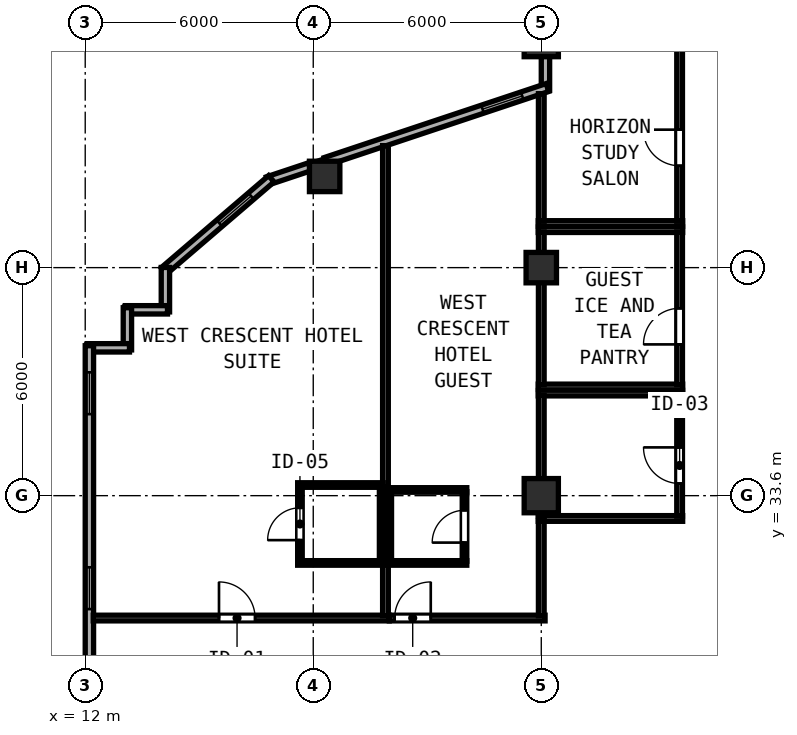
"""IFC4 building model, lengths in metres.
Left out: names, types, materials, properties, quantities, classifications, styles, units other than length and angle.
Written with IfcOpenShell. Run it as: python <this file> out.ifc"""

import sys

from ifc_helpers import new_model, si_unit, direction, frame, frame_2d, origin, origin_2d, place, context, subcontext, project, spatial, rectangle, hollow_rectangle, extrude, element, fill, save


model = new_model("IFC4")
c1 = context("Model", 3, precision=1e-05, world=origin(), true_north=direction((0.0, 1.0)))
c2 = subcontext(c1, "Body", "Model", "MODEL_VIEW")
j1 = project(units=[si_unit("LENGTHUNIT", "METRE"), si_unit("PLANEANGLEUNIT", "RADIAN")], contexts=[c1])
p1 = place(None, origin())
s1 = spatial("IfcSite", under=j1, at=p1, CompositionType="ELEMENT")
p2 = place(p1, origin())
s2 = spatial("IfcBuilding", under=s1, at=p2, CompositionType="ELEMENT")
p3 = place(p2, frame((0.0, 0.0, 176.6)))
s3 = spatial("IfcBuildingStorey", under=s2, at=p3, CompositionType="ELEMENT", Elevation=176.6)
for number, where, z_axis, x_axis in (
    (1, (24.0, 33.6, 0.0), (0.0, 0.0, 1.0), (1.0, 0.0, 0.0)),
    (2, (24.0, 45.6, 0.0), (0.0, 0.0, 1.0), (1.0, 0.0, 0.0)),
):
    element("IfcColumn", number, at=place(p3, frame(where, z_axis=z_axis, x_axis=x_axis)), inside=s3, PredefinedType="COLUMN", context=c2, shape_type="SweptSolid", body=[
        extrude(hollow_rectangle(XDim=0.9, YDim=0.9, WallThickness=0.034, at=origin_2d()), origin(), (0.0, 0.0, 1.0), 3.8),
    ])
for number, where, z_axis, x_axis in (
    (3, (24.0, 39.6, 0.0), (0.0, 0.0, 1.0), (1.0, 0.0, 0.0)),
    (4, (18.3, 42.0, 0.0), (0.0, 0.0, 1.0), (1.0, 0.0, 0.0)),
):
    element("IfcColumn", number, at=place(p3, frame(where, z_axis=z_axis, x_axis=x_axis)), inside=s3, PredefinedType="COLUMN", context=c2, shape_type="SweptSolid", body=[
        extrude(hollow_rectangle(XDim=0.8, YDim=0.8, WallThickness=0.03, at=origin_2d()), origin(), (0.0, 0.0, 1.0), 3.8),
    ])
p4 = place(p3, frame((24.11, 45.158, 0.0), z_axis=(0.0, 0.0, 1.0), x_axis=(0.0, -1.0, 0.0)))
e5 = element("IfcWall", 5, at=p4, inside=s3, PredefinedType="SOLIDWALL", context=c2, shape_type="SweptSolid", body=[
    extrude(rectangle(XDim=0.892, YDim=0.22, at=frame_2d((0.446, 0.0))), origin(), (0.0, 0.0, 1.0), 3.215),
])
p5 = place(p3, frame((24.162, 44.338, 0.0), z_axis=(0.0, 0.0, 1.0), x_axis=(-0.948687265055, -0.316215864755, 0.0)))
e6 = element("IfcWall", 6, at=p5, inside=s3, PredefinedType="SOLIDWALL", context=c2, shape_type="SweptSolid", body=[
    extrude(rectangle(XDim=6.154, YDim=0.22, at=frame_2d((3.077, 0.0))), origin(), (0.0, 0.0, 1.0), 3.215),
])
p6 = place(p5, frame((0.7, 0.0, 0.85)))
e7 = element("IfcOpeningElement", 7, at=p6, cuts=e6, PredefinedType="OPENING", context=c2, shape_type="SweptSolid", body=[
    extrude(rectangle(XDim=1.1, YDim=1.75, at=frame_2d((0.55, 0.875))), frame((0.0, 0.12, 0.0), z_axis=(0.0, -1.0, 0.0), x_axis=(1.0, 0.0, 0.0)), (0.0, 0.0, 1.0), 0.24),
])
p7 = place(p3, frame((17.908, 42.253, 0.0), z_axis=(0.0, 0.0, 1.0), x_axis=(-0.948662335685, -0.316290646166, 0.0)))
e8 = element("IfcWall", 8, at=p7, inside=s3, PredefinedType="SOLIDWALL", context=c2, shape_type="SweptSolid", body=[
    extrude(rectangle(XDim=1.165, YDim=0.22, at=frame_2d((0.583, 0.0))), origin(), (0.0, 0.0, 1.0), 3.62),
])
p8 = place(p3, frame((16.897, 41.938, 0.0), z_axis=(0.0, 0.0, 1.0), x_axis=(-0.759279729622, -0.650764390686, 0.0)))
e9 = element("IfcWall", 9, at=p8, inside=s3, PredefinedType="SOLIDWALL", context=c2, shape_type="SweptSolid", body=[
    extrude(rectangle(XDim=3.726, YDim=0.22, at=frame_2d((1.863, 0.0))), origin(), (0.0, 0.0, 1.0), 3.62),
])
p9 = place(p8, frame((0.7, 0.0, 0.85)))
e10 = element("IfcOpeningElement", 10, at=p9, cuts=e9, PredefinedType="OPENING", context=c2, shape_type="SweptSolid", body=[
    extrude(rectangle(XDim=1.1, YDim=1.75, at=frame_2d((0.55, 0.875))), frame((0.0, 0.12, 0.0), z_axis=(0.0, -1.0, 0.0), x_axis=(1.0, 0.0, 0.0)), (0.0, 0.0, 1.0), 0.24),
])
p10 = place(p3, frame((14.11, 39.604, 0.0), z_axis=(0.0, 0.0, 1.0), x_axis=(0.0, -1.0, 0.0)))
e11 = element("IfcWall", 11, at=p10, inside=s3, PredefinedType="SOLIDWALL", context=c2, shape_type="SweptSolid", body=[
    extrude(rectangle(XDim=1.169, YDim=0.22, at=frame_2d((0.585, 0.0))), origin(), (0.0, 0.0, 1.0), 3.62),
])
p11 = place(p3, frame((14.165, 38.49, 0.0), z_axis=(0.0, 0.0, 1.0), x_axis=(-1.0, 0.0, 0.0)))
e12 = element("IfcWall", 12, at=p11, inside=s3, PredefinedType="SOLIDWALL", context=c2, shape_type="SweptSolid", body=[
    extrude(rectangle(XDim=1.11, YDim=0.22, at=frame_2d((0.555, 0.0))), origin(), (0.0, 0.0, 1.0), 3.62),
])
p12 = place(p3, frame((13.11, 38.545, 0.0), z_axis=(0.0, 0.0, 1.0), x_axis=(0.0, -1.0, 0.0)))
e13 = element("IfcWall", 13, at=p12, inside=s3, PredefinedType="SOLIDWALL", context=c2, shape_type="SweptSolid", body=[
    extrude(rectangle(XDim=1.11, YDim=0.22, at=frame_2d((0.555, 0.0))), origin(), (0.0, 0.0, 1.0), 3.62),
])
p13 = place(p3, frame((13.165, 37.49, 0.0), z_axis=(0.0, 0.0, 1.0), x_axis=(-1.0, 0.0, 0.0)))
e14 = element("IfcWall", 14, at=p13, inside=s3, PredefinedType="SOLIDWALL", context=c2, shape_type="SweptSolid", body=[
    extrude(rectangle(XDim=1.11, YDim=0.22, at=frame_2d((0.555, 0.0))), origin(), (0.0, 0.0, 1.0), 3.62),
])
p14 = place(p3, frame((12.11, 37.545, 0.0), z_axis=(0.0, 0.0, 1.0), x_axis=(0.0, -1.0, 0.0)))
e15 = element("IfcWall", 15, at=p14, inside=s3, PredefinedType="SOLIDWALL", context=c2, shape_type="SweptSolid", body=[
    extrude(rectangle(XDim=21.145, YDim=0.22, at=frame_2d((10.573, 0.0))), origin(), (0.0, 0.0, 1.0), 3.62),
])
p15 = place(p14, frame((0.7, 0.0, 0.85)))
e16 = element("IfcOpeningElement", 16, at=p15, cuts=e15, PredefinedType="OPENING", context=c2, shape_type="SweptSolid", body=[
    extrude(rectangle(XDim=1.1, YDim=1.75, at=frame_2d((0.55, 0.875))), frame((0.0, 0.12, 0.0), z_axis=(0.0, -1.0, 0.0), x_axis=(1.0, 0.0, 0.0)), (0.0, 0.0, 1.0), 0.24),
])
p16 = place(p14, frame((5.83, 0.0, 0.85)))
e17 = element("IfcOpeningElement", 17, at=p16, cuts=e15, PredefinedType="OPENING", context=c2, shape_type="SweptSolid", body=[
    extrude(rectangle(XDim=1.1, YDim=1.75, at=frame_2d((0.55, 0.875))), frame((0.0, 0.12, 0.0), z_axis=(0.0, -1.0, 0.0), x_axis=(1.0, 0.0, 0.0)), (0.0, 0.0, 1.0), 0.24),
])
p17 = place(p14, frame((11.5, 0.0, 0.85)))
e18 = element("IfcOpeningElement", 18, at=p17, cuts=e15, PredefinedType="OPENING", context=c2, shape_type="SweptSolid", body=[
    extrude(rectangle(XDim=1.1, YDim=1.75, at=frame_2d((0.55, 0.875))), frame((0.0, 0.12, 0.0), z_axis=(0.0, -1.0, 0.0), x_axis=(1.0, 0.0, 0.0)), (0.0, 0.0, 1.0), 0.24),
])
p18 = place(p14, frame((16.9, 0.0, 0.85)))
e19 = element("IfcOpeningElement", 19, at=p18, cuts=e15, PredefinedType="OPENING", context=c2, shape_type="SweptSolid", body=[
    extrude(rectangle(XDim=1.1, YDim=1.75, at=frame_2d((0.55, 0.875))), frame((0.0, 0.12, 0.0), z_axis=(0.0, -1.0, 0.0), x_axis=(1.0, 0.0, 0.0)), (0.0, 0.0, 1.0), 0.24),
])
for number, where, z_axis, x_axis in (
    (20, (23.92, 36.3, 0.0), (0.0, 0.0, 1.0), (1.0, 0.0, 0.0)),
    (21, (23.92, 33.0, 0.0), (0.0, 0.0, 1.0), (1.0, 0.0, 0.0)),
):
    element("IfcWall", number, at=place(p3, frame(where, z_axis=z_axis, x_axis=x_axis)), inside=s3, PredefinedType="PARTITIONING", context=c2, shape_type="SweptSolid", body=[
        extrude(rectangle(XDim=3.8, YDim=0.15, at=frame_2d((1.9, 0.0))), origin(), (0.0, 0.0, 1.0), 3.62),
    ])
p19 = place(p3, frame((24.0, 33.06, 0.0), z_axis=(0.0, 0.0, 1.0), x_axis=(0.0, 1.0, 0.0)))
e22 = element("IfcWall", 22, at=p19, inside=s3, PredefinedType="PARTITIONING", context=c2, shape_type="SweptSolid", body=[
    extrude(rectangle(XDim=3.18, YDim=0.15, at=frame_2d((1.59, 0.0))), origin(), (0.0, 0.0, 1.0), 3.215),
])
p20 = place(p3, frame((27.64, 33.06, 0.0), z_axis=(0.0, 0.0, 1.0), x_axis=(0.0, 1.0, 0.0)))
e23 = element("IfcWall", 23, at=p20, inside=s3, PredefinedType="PARTITIONING", context=c2, shape_type="SweptSolid", body=[
    extrude(rectangle(XDim=3.18, YDim=0.15, at=frame_2d((1.59, 0.0))), origin(), (0.0, 0.0, 1.0), 3.62),
])
p21 = place(p20, frame((1.81, 0.0, 0.0), z_axis=(0.0, 0.0, 1.0), x_axis=(-1.0, 0.0, 0.0)))
e24 = element("IfcOpeningElement", 24, at=p21, cuts=e23, PredefinedType="OPENING", context=c2, shape_type="SweptSolid", body=[
    extrude(rectangle(XDim=0.95, YDim=2.12, at=frame_2d((0.475, 1.06))), frame((0.0, 0.085, 0.0), z_axis=(0.0, -1.0, 0.0), x_axis=(1.0, 0.0, 0.0)), (0.0, 0.0, 1.0), 0.17),
])
for number, where, z_axis, x_axis in (
    (25, (23.92, 40.6, 0.0), (0.0, 0.0, 1.0), (1.0, 0.0, 0.0)),
    (26, (23.92, 36.46, 0.0), (0.0, 0.0, 1.0), (1.0, 0.0, 0.0)),
):
    element("IfcWall", number, at=place(p3, frame(where, z_axis=z_axis, x_axis=x_axis)), inside=s3, PredefinedType="PARTITIONING", context=c2, shape_type="SweptSolid", body=[
        extrude(rectangle(XDim=3.8, YDim=0.15, at=frame_2d((1.9, 0.0))), origin(), (0.0, 0.0, 1.0), 3.62),
    ])
p22 = place(p3, frame((24.0, 36.52, 0.0), z_axis=(0.0, 0.0, 1.0), x_axis=(0.0, 1.0, 0.0)))
e27 = element("IfcWall", 27, at=p22, inside=s3, PredefinedType="PARTITIONING", context=c2, shape_type="SweptSolid", body=[
    extrude(rectangle(XDim=4.02, YDim=0.15, at=frame_2d((2.01, 0.0))), origin(), (0.0, 0.0, 1.0), 3.215),
])
p23 = place(p3, frame((27.64, 36.52, 0.0), z_axis=(0.0, 0.0, 1.0), x_axis=(0.0, 1.0, 0.0)))
e28 = element("IfcWall", 28, at=p23, inside=s3, PredefinedType="PARTITIONING", context=c2, shape_type="SweptSolid", body=[
    extrude(rectangle(XDim=4.02, YDim=0.15, at=frame_2d((2.01, 0.0))), origin(), (0.0, 0.0, 1.0), 3.62),
])
p24 = place(p23, frame((2.01, 0.0, 0.0), z_axis=(0.0, 0.0, 1.0), x_axis=(-1.0, 0.0, 0.0)))
e29 = element("IfcOpeningElement", 29, at=p24, cuts=e28, PredefinedType="OPENING", context=c2, shape_type="SweptSolid", body=[
    extrude(rectangle(XDim=0.95, YDim=2.12, at=frame_2d((0.475, 1.06))), frame((0.0, 0.085, 0.0), z_axis=(0.0, -1.0, 0.0), x_axis=(1.0, 0.0, 0.0)), (0.0, 0.0, 1.0), 0.17),
])
p25 = place(p3, frame((23.92, 40.76, 0.0), z_axis=(0.0, 0.0, 1.0), x_axis=(1.0, 0.0, 0.0)))
e30 = element("IfcWall", 30, at=p25, inside=s3, PredefinedType="PARTITIONING", context=c2, shape_type="SweptSolid", body=[
    extrude(rectangle(XDim=3.8, YDim=0.15, at=frame_2d((1.9, 0.0))), origin(), (0.0, 0.0, 1.0), 3.62),
])
p26 = place(p3, frame((24.0, 40.82, 0.0), z_axis=(0.0, 0.0, 1.0), x_axis=(0.0, 1.0, 0.0)))
e31 = element("IfcWall", 31, at=p26, inside=s3, PredefinedType="PARTITIONING", context=c2, shape_type="SweptSolid", body=[
    extrude(rectangle(XDim=3.356, YDim=0.15, at=frame_2d((1.678, 0.0))), origin(), (0.0, 0.0, 1.0), 3.215),
])
p27 = place(p3, frame((27.64, 40.82, 0.0), z_axis=(0.0, 0.0, 1.0), x_axis=(0.0, 1.0, 0.0)))
e32 = element("IfcWall", 32, at=p27, inside=s3, PredefinedType="PARTITIONING", context=c2, shape_type="SweptSolid", body=[
    extrude(rectangle(XDim=5.14, YDim=0.15, at=frame_2d((2.57, 0.0))), origin(), (0.0, 0.0, 1.0), 3.62),
])
p28 = place(p27, frame((2.41, 0.0, 0.0), z_axis=(0.0, 0.0, 1.0), x_axis=(-1.0, 0.0, 0.0)))
e33 = element("IfcOpeningElement", 33, at=p28, cuts=e32, PredefinedType="OPENING", context=c2, shape_type="SweptSolid", body=[
    extrude(rectangle(XDim=0.95, YDim=2.12, at=frame_2d((0.475, 1.06))), frame((0.0, 0.085, 0.0), z_axis=(0.0, -1.0, 0.0), x_axis=(1.0, 0.0, 0.0)), (0.0, 0.0, 1.0), 0.17),
])
p29 = place(p3, frame((12.212, 30.38, 0.0), z_axis=(0.0, 0.0, 1.0), x_axis=(1.0, 0.0, 0.0)))
e34 = element("IfcWall", 34, at=p29, inside=s3, PredefinedType="PARTITIONING", context=c2, shape_type="SweptSolid", body=[
    extrude(rectangle(XDim=7.788, YDim=0.15, at=frame_2d((3.894, 0.0))), origin(), (0.0, 0.0, 1.0), 3.62),
])
p30 = place(p29, frame((3.308, 0.0, 0.0)))
e35 = element("IfcOpeningElement", 35, at=p30, cuts=e34, PredefinedType="OPENING", context=c2, shape_type="SweptSolid", body=[
    extrude(rectangle(XDim=0.95, YDim=2.18, at=frame_2d((0.475, 1.09))), frame((0.0, 0.085, 0.0), z_axis=(0.0, -1.0, 0.0), x_axis=(1.0, 0.0, 0.0)), (0.0, 0.0, 1.0), 0.17),
])
p31 = place(p3, frame((19.9, 30.44, 0.0), z_axis=(0.0, 0.0, 1.0), x_axis=(0.0, 1.0, 0.0)))
e36 = element("IfcWall", 36, at=p31, inside=s3, PredefinedType="PARTITIONING", context=c2, shape_type="SweptSolid", body=[
    extrude(rectangle(XDim=12.37, YDim=0.15, at=frame_2d((6.185, 0.0))), origin(), (0.0, 0.0, 1.0), 3.62),
])
for number, where, z_axis, x_axis in (
    (37, (17.59, 33.88, 0.0), (0.0, 0.0, 1.0), (1.0, 0.0, 0.0)),
    (38, (17.59, 31.83, 0.0), (0.0, 0.0, 1.0), (1.0, 0.0, 0.0)),
):
    element("IfcWall", number, at=place(p3, frame(where, z_axis=z_axis, x_axis=x_axis)), inside=s3, PredefinedType="PARTITIONING", context=c2, shape_type="SweptSolid", body=[
        extrude(rectangle(XDim=2.25, YDim=0.12, at=frame_2d((1.125, 0.0))), origin(), (0.0, 0.0, 1.0), 3.62),
    ])
p32 = place(p3, frame((17.65, 31.875, 0.0), z_axis=(0.0, 0.0, 1.0), x_axis=(0.0, 1.0, 0.0)))
e39 = element("IfcWall", 39, at=p32, inside=s3, PredefinedType="PARTITIONING", context=c2, shape_type="SweptSolid", body=[
    extrude(rectangle(XDim=1.96, YDim=0.12, at=frame_2d((0.98, 0.0))), origin(), (0.0, 0.0, 1.0), 3.62),
])
p33 = place(p32, frame((1.405, 0.0, 0.0), z_axis=(0.0, 0.0, 1.0), x_axis=(-1.0, 0.0, 0.0)))
e40 = element("IfcOpeningElement", 40, at=p33, cuts=e39, PredefinedType="OPENING", context=c2, shape_type="SweptSolid", body=[
    extrude(rectangle(XDim=0.85, YDim=2.1, at=frame_2d((0.425, 1.05))), frame((0.0, 0.07, 0.0), z_axis=(0.0, -1.0, 0.0), x_axis=(1.0, 0.0, 0.0)), (0.0, 0.0, 1.0), 0.14),
])
p34 = place(p3, frame((19.8, 31.875, 0.0), z_axis=(0.0, 0.0, 1.0), x_axis=(0.0, 1.0, 0.0)))
e41 = element("IfcWall", 41, at=p34, inside=s3, PredefinedType="PARTITIONING", context=c2, shape_type="SweptSolid", body=[
    extrude(rectangle(XDim=1.96, YDim=0.12, at=frame_2d((0.98, 0.0))), origin(), (0.0, 0.0, 1.0), 3.62),
])
p35 = place(p3, frame((20.002, 30.38, 0.0), z_axis=(0.0, 0.0, 1.0), x_axis=(1.0, 0.0, 0.0)))
e42 = element("IfcWall", 42, at=p35, inside=s3, PredefinedType="PARTITIONING", context=c2, shape_type="SweptSolid", body=[
    extrude(rectangle(XDim=4.098, YDim=0.15, at=frame_2d((2.049, 0.0))), origin(), (0.0, 0.0, 1.0), 3.62),
])
p36 = place(p35, frame((0.14, 0.0, 0.0)))
e43 = element("IfcOpeningElement", 43, at=p36, cuts=e42, PredefinedType="OPENING", context=c2, shape_type="SweptSolid", body=[
    extrude(rectangle(XDim=0.95, YDim=2.15, at=frame_2d((0.475, 1.075))), frame((0.0, 0.085, 0.0), z_axis=(0.0, -1.0, 0.0), x_axis=(1.0, 0.0, 0.0)), (0.0, 0.0, 1.0), 0.17),
])
p37 = place(p3, frame((24.0, 30.44, 0.0), z_axis=(0.0, 0.0, 1.0), x_axis=(0.0, 1.0, 0.0)))
e44 = element("IfcWall", 44, at=p37, inside=s3, PredefinedType="PARTITIONING", context=c2, shape_type="SweptSolid", body=[
    extrude(rectangle(XDim=2.5, YDim=0.15, at=frame_2d((1.25, 0.0))), origin(), (0.0, 0.0, 1.0), 3.215),
])
for number, where, z_axis, x_axis in (
    (45, (19.96, 33.75, 0.0), (0.0, 0.0, 1.0), (1.0, 0.0, 0.0)),
    (46, (19.96, 31.83, 0.0), (0.0, 0.0, 1.0), (1.0, 0.0, 0.0)),
):
    element("IfcWall", number, at=place(p3, frame(where, z_axis=z_axis, x_axis=x_axis)), inside=s3, PredefinedType="PARTITIONING", context=c2, shape_type="SweptSolid", body=[
        extrude(rectangle(XDim=2.08, YDim=0.12, at=frame_2d((1.04, 0.0))), origin(), (0.0, 0.0, 1.0), 3.62),
    ])
p38 = place(p3, frame((20.0, 31.875, 0.0), z_axis=(0.0, 0.0, 1.0), x_axis=(0.0, 1.0, 0.0)))
e47 = element("IfcWall", 47, at=p38, inside=s3, PredefinedType="PARTITIONING", context=c2, shape_type="SweptSolid", body=[
    extrude(rectangle(XDim=1.83, YDim=0.12, at=frame_2d((0.915, 0.0))), origin(), (0.0, 0.0, 1.0), 3.62),
])
p39 = place(p3, frame((21.98, 31.875, 0.0), z_axis=(0.0, 0.0, 1.0), x_axis=(0.0, 1.0, 0.0)))
e48 = element("IfcWall", 48, at=p39, inside=s3, PredefinedType="PARTITIONING", context=c2, shape_type="SweptSolid", body=[
    extrude(rectangle(XDim=1.83, YDim=0.12, at=frame_2d((0.915, 0.0))), origin(), (0.0, 0.0, 1.0), 3.62),
])
p40 = place(p39, frame((0.49, 0.0, 0.0)))
e49 = element("IfcOpeningElement", 49, at=p40, cuts=e48, PredefinedType="OPENING", context=c2, shape_type="SweptSolid", body=[
    extrude(rectangle(XDim=0.85, YDim=2.1, at=frame_2d((0.425, 1.05))), frame((0.0, 0.07, 0.0), z_axis=(0.0, -1.0, 0.0), x_axis=(1.0, 0.0, 0.0)), (0.0, 0.0, 1.0), 0.14),
])
p41 = place(p6, origin())
e50 = element("IfcWindow", 50, at=p41, inside=s3, PartitioningType="SINGLE_PANEL", PredefinedType="WINDOW", context=c2, shape_type="SweptSolid", body=[
    extrude(rectangle(XDim=1.1, YDim=1.75, at=frame_2d((0.55, 0.875))), frame((0.0, 0.03, 0.0), z_axis=(0.0, -1.0, 0.0), x_axis=(1.0, 0.0, 0.0)), (0.0, 0.0, 1.0), 0.06),
])
fill(e7, e50)
p42 = place(p9, origin())
e51 = element("IfcWindow", 51, at=p42, inside=s3, PartitioningType="SINGLE_PANEL", PredefinedType="WINDOW", context=c2, shape_type="SweptSolid", body=[
    extrude(rectangle(XDim=1.1, YDim=1.75, at=frame_2d((0.55, 0.875))), frame((0.0, 0.03, 0.0), z_axis=(0.0, -1.0, 0.0), x_axis=(1.0, 0.0, 0.0)), (0.0, 0.0, 1.0), 0.06),
])
fill(e10, e51)
p43 = place(p15, origin())
e52 = element("IfcWindow", 52, at=p43, inside=s3, PartitioningType="SINGLE_PANEL", PredefinedType="WINDOW", context=c2, shape_type="SweptSolid", body=[
    extrude(rectangle(XDim=1.1, YDim=1.75, at=frame_2d((0.55, 0.875))), frame((0.0, 0.03, 0.0), z_axis=(0.0, -1.0, 0.0), x_axis=(1.0, 0.0, 0.0)), (0.0, 0.0, 1.0), 0.06),
])
fill(e16, e52)
p44 = place(p16, origin())
e53 = element("IfcWindow", 53, at=p44, inside=s3, PartitioningType="SINGLE_PANEL", PredefinedType="WINDOW", context=c2, shape_type="SweptSolid", body=[
    extrude(rectangle(XDim=1.1, YDim=1.75, at=frame_2d((0.55, 0.875))), frame((0.0, 0.03, 0.0), z_axis=(0.0, -1.0, 0.0), x_axis=(1.0, 0.0, 0.0)), (0.0, 0.0, 1.0), 0.06),
])
fill(e17, e53)
p45 = place(p21, origin())
e54 = element("IfcDoor", 54, at=p45, inside=s3, OperationType="SINGLE_SWING_LEFT", PredefinedType="DOOR", context=c2, shape_type="SweptSolid", body=[
    extrude(rectangle(XDim=0.95, YDim=2.12, at=frame_2d((0.475, 1.06))), frame((0.0, 0.025, 0.0), z_axis=(0.0, -1.0, 0.0), x_axis=(1.0, 0.0, 0.0)), (0.0, 0.0, 1.0), 0.05),
])
fill(e24, e54)
p46 = place(p24, origin())
e55 = element("IfcDoor", 55, at=p46, inside=s3, OperationType="SINGLE_SWING_RIGHT", PredefinedType="DOOR", context=c2, shape_type="SweptSolid", body=[
    extrude(rectangle(XDim=0.95, YDim=2.12, at=frame_2d((0.475, 1.06))), frame((0.0, 0.025, 0.0), z_axis=(0.0, -1.0, 0.0), x_axis=(1.0, 0.0, 0.0)), (0.0, 0.0, 1.0), 0.05),
])
fill(e29, e55)
p47 = place(p28, origin())
e56 = element("IfcDoor", 56, at=p47, inside=s3, OperationType="SINGLE_SWING_LEFT", PredefinedType="DOOR", context=c2, shape_type="SweptSolid", body=[
    extrude(rectangle(XDim=0.95, YDim=2.12, at=frame_2d((0.475, 1.06))), frame((0.0, 0.025, 0.0), z_axis=(0.0, -1.0, 0.0), x_axis=(1.0, 0.0, 0.0)), (0.0, 0.0, 1.0), 0.05),
])
fill(e33, e56)
p48 = place(p30, origin())
e57 = element("IfcDoor", 57, at=p48, inside=s3, OperationType="SINGLE_SWING_LEFT", PredefinedType="DOOR", context=c2, shape_type="SweptSolid", body=[
    extrude(rectangle(XDim=0.95, YDim=2.18, at=frame_2d((0.475, 1.09))), frame((0.0, 0.025, 0.0), z_axis=(0.0, -1.0, 0.0), x_axis=(1.0, 0.0, 0.0)), (0.0, 0.0, 1.0), 0.05),
])
fill(e35, e57)
p49 = place(p33, origin())
e58 = element("IfcDoor", 58, at=p49, inside=s3, OperationType="SINGLE_SWING_RIGHT", PredefinedType="DOOR", context=c2, shape_type="SweptSolid", body=[
    extrude(rectangle(XDim=0.85, YDim=2.1, at=frame_2d((0.425, 1.05))), frame((0.0, 0.025, 0.0), z_axis=(0.0, -1.0, 0.0), x_axis=(1.0, 0.0, 0.0)), (0.0, 0.0, 1.0), 0.05),
])
fill(e40, e58)
p50 = place(p36, origin())
e59 = element("IfcDoor", 59, at=p50, inside=s3, OperationType="SINGLE_SWING_RIGHT", PredefinedType="DOOR", context=c2, shape_type="SweptSolid", body=[
    extrude(rectangle(XDim=0.95, YDim=2.15, at=frame_2d((0.475, 1.075))), frame((0.0, 0.025, 0.0), z_axis=(0.0, -1.0, 0.0), x_axis=(1.0, 0.0, 0.0)), (0.0, 0.0, 1.0), 0.05),
])
fill(e43, e59)
p51 = place(p40, origin())
e60 = element("IfcDoor", 60, at=p51, inside=s3, OperationType="SINGLE_SWING_LEFT", PredefinedType="DOOR", context=c2, shape_type="SweptSolid", body=[
    extrude(rectangle(XDim=0.85, YDim=2.1, at=frame_2d((0.425, 1.05))), frame((0.0, 0.025, 0.0), z_axis=(0.0, -1.0, 0.0), x_axis=(1.0, 0.0, 0.0)), (0.0, 0.0, 1.0), 0.05),
])
fill(e49, e60)
save(model, sys.argv[1])
